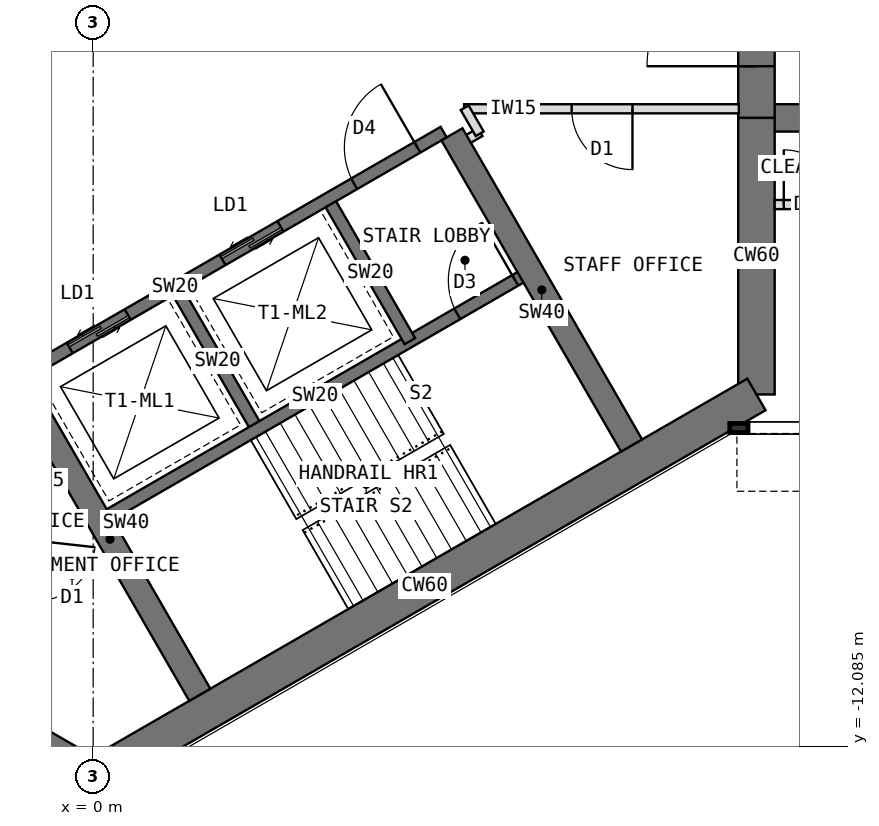
"""IFC4 building model, lengths in metres.
Left out: names, types, materials, properties, quantities, classifications, styles, units other than length and angle.
Written with IfcOpenShell. Run it as: python <this file> out.ifc"""

import sys

from ifc_helpers import new_model, si_unit, direction, frame, frame_2d, origin, place, context, subcontext, project, spatial, rectangle, extrude, element, fill, save


model = new_model("IFC4")
c1 = context("Model", 3, precision=1e-05, world=origin(), true_north=direction((0.0, 1.0)))
c2 = subcontext(c1, "Body", "Model", "MODEL_VIEW")
j1 = project(units=[si_unit("LENGTHUNIT", "METRE"), si_unit("PLANEANGLEUNIT", "RADIAN")], contexts=[c1])
p1 = place(None, origin())
s1 = spatial("IfcSite", under=j1, at=p1, CompositionType="ELEMENT")
p2 = place(p1, origin())
s2 = spatial("IfcBuilding", under=s1, at=p2, CompositionType="ELEMENT")
p3 = place(p2, frame((0.0, 0.0, 121.5)))
s3 = spatial("IfcBuildingStorey", under=s2, at=p3, CompositionType="ELEMENT", Elevation=121.5)
p4 = place(p3, frame((10.908, -6.298, 0.0), z_axis=(0.0, 0.0, 1.0), x_axis=(0.0, 1.0, 0.0)))
e1 = element("IfcWall", 1, at=p4, inside=s3, PredefinedType="SHEAR", context=c2, shape_type="SweptSolid", body=[
    extrude(rectangle(XDim=4.548, YDim=0.6, at=frame_2d((2.274, 0.0))), origin(), (0.0, 0.0, 1.0), 4.0),
])
p5 = place(p3, frame((10.908, -1.75, 0.0), z_axis=(0.0, 0.0, 1.0), x_axis=(0.0, 1.0, 0.0)))
e2 = element("IfcWall", 2, at=p5, inside=s3, PredefinedType="SHEAR", context=c2, shape_type="SweptSolid", body=[
    extrude(rectangle(XDim=3.5, YDim=0.6, at=frame_2d((1.75, 0.0))), origin(), (0.0, 0.0, 1.0), 4.0),
])
p6 = place(p5, frame((0.85, 0.0, 0.0)))
e3 = element("IfcOpeningElement", 3, at=p6, cuts=e2, PredefinedType="OPENING", context=c2, shape_type="SweptSolid", body=[
    extrude(rectangle(XDim=1.8, YDim=2.1, at=frame_2d((0.9, 1.05))), frame((0.0, 0.31, 0.0), z_axis=(0.0, -1.0, 0.0), x_axis=(1.0, 0.0, 0.0)), (0.0, 0.0, 1.0), 0.62),
])
p7 = place(p3, frame((-3.939, -10.322, 0.0), z_axis=(0.0, 0.0, 1.0), x_axis=(0.866011268655, -0.500024481964, 0.0)))
e4 = element("IfcWall", 4, at=p7, inside=s3, PredefinedType="SHEAR", context=c2, shape_type="SweptSolid", body=[
    extrude(rectangle(XDim=4.548, YDim=0.6, at=frame_2d((2.274, 0.0))), origin(), (0.0, 0.0, 1.0), 4.0),
])
p8 = place(p3, frame((0.0, -12.596, 0.0), z_axis=(0.0, 0.0, 1.0), x_axis=(0.866021940709, 0.500005998175, 0.0)))
e5 = element("IfcWall", 5, at=p8, inside=s3, PredefinedType="SHEAR", context=c2, shape_type="SweptSolid", body=[
    extrude(rectangle(XDim=12.596, YDim=0.6, at=frame_2d((6.298, 0.0))), origin(), (0.0, 0.0, 1.0), 4.0),
])
p9 = place(p3, frame((10.908, -1.75, 0.0), z_axis=(0.0, 0.0, 1.0), x_axis=(1.0, 0.0, 0.0)))
e6 = element("IfcWall", 6, at=p9, inside=s3, PredefinedType="SHEAR", context=c2, shape_type="SweptSolid", body=[
    extrude(rectangle(XDim=2.592, YDim=0.45, at=frame_2d((1.296, 0.0))), origin(), (0.0, 0.0, 1.0), 4.0),
])
p10 = place(p3, frame((-1.164, -5.984, 0.0), z_axis=(0.0, 0.0, 1.0), x_axis=(0.866026010844, 0.49999894854, 0.0)))
e7 = element("IfcWall", 7, at=p10, inside=s3, PredefinedType="SHEAR", context=c2, shape_type="SweptSolid", body=[
    extrude(rectangle(XDim=8.0, YDim=0.2, at=frame_2d((4.0, 0.0))), origin(), (0.0, 0.0, 1.0), 4.0),
])
p11 = place(p10, frame((6.3, 0.0, 0.0)))
e8 = element("IfcOpeningElement", 8, at=p11, cuts=e7, PredefinedType="OPENING", context=c2, shape_type="SweptSolid", body=[
    extrude(rectangle(XDim=1.2, YDim=2.1, at=frame_2d((0.6, 1.05))), frame((0.0, 0.11, 0.0), z_axis=(0.0, -1.0, 0.0), x_axis=(1.0, 0.0, 0.0)), (0.0, 0.0, 1.0), 0.22),
])
p12 = place(p10, frame((0.9, 0.0, 0.0)))
e9 = element("IfcOpeningElement", 9, at=p12, cuts=e7, PredefinedType="OPENING", context=c2, shape_type="SweptSolid", body=[
    extrude(rectangle(XDim=1.1, YDim=2.2, at=frame_2d((0.55, 1.1))), frame((0.0, 0.11, 0.0), z_axis=(0.0, -1.0, 0.0), x_axis=(1.0, 0.0, 0.0)), (0.0, 0.0, 1.0), 0.22),
])
p13 = place(p10, frame((3.8, 0.0, 0.0)))
e10 = element("IfcOpeningElement", 10, at=p13, cuts=e7, PredefinedType="OPENING", context=c2, shape_type="SweptSolid", body=[
    extrude(rectangle(XDim=1.1, YDim=2.2, at=frame_2d((0.55, 1.1))), frame((0.0, 0.11, 0.0), z_axis=(0.0, -1.0, 0.0), x_axis=(1.0, 0.0, 0.0)), (0.0, 0.0, 1.0), 0.22),
])
p14 = place(p3, frame((1.397, -4.62, 0.0), z_axis=(0.0, 0.0, 1.0), x_axis=(0.499936506574, -0.866062058628, 0.0)))
e11 = element("IfcWall", 11, at=p14, inside=s3, PredefinedType="SHEAR", context=c2, shape_type="SweptSolid", body=[
    extrude(rectangle(XDim=2.6, YDim=0.2, at=frame_2d((1.3, 0.0))), origin(), (0.0, 0.0, 1.0), 4.0),
])
p15 = place(p3, frame((3.909, -3.17, 0.0), z_axis=(0.0, 0.0, 1.0), x_axis=(0.49997716683, -0.86603858612, 0.0)))
e12 = element("IfcWall", 12, at=p15, inside=s3, PredefinedType="SHEAR", context=c2, shape_type="SweptSolid", body=[
    extrude(rectangle(XDim=2.6, YDim=0.2, at=frame_2d((1.3, 0.0))), origin(), (0.0, 0.0, 1.0), 4.0),
])
p16 = place(p3, frame((0.186, -8.322, 0.0), z_axis=(0.0, 0.0, 1.0), x_axis=(0.866026010844, 0.49999894854, 0.0)))
e13 = element("IfcWall", 13, at=p16, inside=s3, PredefinedType="SHEAR", context=c2, shape_type="SweptSolid", body=[
    extrude(rectangle(XDim=8.0, YDim=0.2, at=frame_2d((4.0, 0.0))), origin(), (0.0, 0.0, 1.0), 4.0),
])
p17 = place(p16, frame((6.7, 0.0, 0.0)))
e14 = element("IfcOpeningElement", 14, at=p17, cuts=e13, PredefinedType="OPENING", context=c2, shape_type="SweptSolid", body=[
    extrude(rectangle(XDim=1.1, YDim=2.1, at=frame_2d((0.55, 1.05))), frame((0.0, 0.11, 0.0), z_axis=(0.0, -1.0, 0.0), x_axis=(1.0, 0.0, 0.0)), (0.0, 0.0, 1.0), 0.22),
])
p18 = place(p3, frame((5.901, -2.02, 0.0), z_axis=(0.0, 0.0, 1.0), x_axis=(0.500027676417, -0.866009424208, 0.0)))
e15 = element("IfcWall", 15, at=p18, inside=s3, PredefinedType="SHEAR", context=c2, shape_type="SweptSolid", body=[
    extrude(rectangle(XDim=5.908, YDim=0.4, at=frame_2d((2.954, 0.0))), origin(), (0.0, 0.0, 1.0), 4.0),
])
p19 = place(p3, frame((-1.201, -6.12, 0.0), z_axis=(0.0, 0.0, 1.0), x_axis=(0.49999668571, -0.866027317282, 0.0)))
e16 = element("IfcWall", 16, at=p19, inside=s3, PredefinedType="SHEAR", context=c2, shape_type="SweptSolid", body=[
    extrude(rectangle(XDim=5.908, YDim=0.4, at=frame_2d((2.954, 0.0))), origin(), (0.0, 0.0, 1.0), 4.0),
])
p20 = place(p3, frame((11.208, -3.175, 0.0), z_axis=(0.0, 0.0, 1.0), x_axis=(1.0, 0.0, 0.0)))
e17 = element("IfcWall", 17, at=p20, inside=s3, PredefinedType="PARTITIONING", context=c2, shape_type="SweptSolid", body=[
    extrude(rectangle(XDim=2.4, YDim=0.15, at=frame_2d((1.2, 0.0))), origin(), (0.0, 0.0, 1.0), 3.8),
])
p21 = place(p20, frame((0.15, 0.0, 0.0)))
e18 = element("IfcOpeningElement", 18, at=p21, cuts=e17, PredefinedType="OPENING", context=c2, shape_type="SweptSolid", body=[
    extrude(rectangle(XDim=0.9, YDim=2.1, at=frame_2d((0.45, 1.05))), frame((0.0, 0.085, 0.0), z_axis=(0.0, -1.0, 0.0), x_axis=(1.0, 0.0, 0.0)), (0.0, 0.0, 1.0), 0.17),
])
p22 = place(p3, frame((6.365, -1.983, 0.0), z_axis=(0.0, 0.0, 1.0), x_axis=(-0.865892400268, -0.500230298122, 0.0)))
e19 = element("IfcWall", 19, at=p22, inside=s3, PredefinedType="PARTITIONING", context=c2, shape_type="SweptSolid", body=[
    extrude(rectangle(XDim=0.43, YDim=0.15, at=frame_2d((0.215, 0.0))), origin(), (0.0, 0.0, 1.0), 3.8),
])
p23 = place(p3, frame((10.618, -1.6, 0.0), z_axis=(0.0, 0.0, 1.0), x_axis=(-1.0, 0.0, 0.0)))
e20 = element("IfcWall", 20, at=p23, inside=s3, PredefinedType="PARTITIONING", context=c2, shape_type="SweptSolid", body=[
    extrude(rectangle(XDim=4.519, YDim=0.15, at=frame_2d((2.259, 0.0))), origin(), (0.0, 0.0, 1.0), 3.8),
])
p24 = place(p23, frame((1.749, 0.0, 0.0)))
e21 = element("IfcOpeningElement", 21, at=p24, cuts=e20, PredefinedType="OPENING", context=c2, shape_type="SweptSolid", body=[
    extrude(rectangle(XDim=1.0, YDim=2.1, at=frame_2d((0.5, 1.05))), frame((0.0, 0.085, 0.0), z_axis=(0.0, -1.0, 0.0), x_axis=(1.0, 0.0, 0.0)), (0.0, 0.0, 1.0), 0.17),
])
p25 = place(p3, frame((6.11, -1.583, 0.0), z_axis=(0.0, 0.0, 1.0), x_axis=(0.50033519877, -0.865831790172, 0.0)))
e22 = element("IfcWall", 22, at=p25, inside=s3, PredefinedType="PARTITIONING", context=c2, shape_type="SweptSolid", body=[
    extrude(rectangle(XDim=0.494, YDim=0.15, at=frame_2d((0.247, 0.0))), origin(), (0.0, 0.0, 1.0), 3.8),
])
p26 = place(p11, origin())
e23 = element("IfcDoor", 23, at=p26, inside=s3, OperationType="SINGLE_SWING_RIGHT", PredefinedType="DOOR", context=c2, shape_type="SweptSolid", body=[
    extrude(rectangle(XDim=1.2, YDim=2.1, at=frame_2d((0.6, 1.05))), frame((0.0, 0.025, 0.0), z_axis=(0.0, -1.0, 0.0), x_axis=(1.0, 0.0, 0.0)), (0.0, 0.0, 1.0), 0.05),
])
fill(e8, e23)
p27 = place(p12, origin())
e24 = element("IfcDoor", 24, at=p27, inside=s3, OperationType="DOUBLE_DOOR_SLIDING", PredefinedType="DOOR", context=c2, shape_type="SweptSolid", body=[
    extrude(rectangle(XDim=1.1, YDim=2.2, at=frame_2d((0.55, 1.1))), frame((0.0, 0.025, 0.0), z_axis=(0.0, -1.0, 0.0), x_axis=(1.0, 0.0, 0.0)), (0.0, 0.0, 1.0), 0.05),
])
fill(e9, e24)
p28 = place(p13, origin())
e25 = element("IfcDoor", 25, at=p28, inside=s3, OperationType="DOUBLE_DOOR_SLIDING", PredefinedType="DOOR", context=c2, shape_type="SweptSolid", body=[
    extrude(rectangle(XDim=1.1, YDim=2.2, at=frame_2d((0.55, 1.1))), frame((0.0, 0.025, 0.0), z_axis=(0.0, -1.0, 0.0), x_axis=(1.0, 0.0, 0.0)), (0.0, 0.0, 1.0), 0.05),
])
fill(e10, e25)
p29 = place(p17, origin())
e26 = element("IfcDoor", 26, at=p29, inside=s3, OperationType="SINGLE_SWING_RIGHT", PredefinedType="DOOR", context=c2, shape_type="SweptSolid", body=[
    extrude(rectangle(XDim=1.1, YDim=2.1, at=frame_2d((0.55, 1.05))), frame((0.0, 0.025, 0.0), z_axis=(0.0, -1.0, 0.0), x_axis=(1.0, 0.0, 0.0)), (0.0, 0.0, 1.0), 0.05),
])
fill(e14, e26)
p30 = place(p6, origin())
e27 = element("IfcDoor", 27, at=p30, inside=s3, OperationType="DOUBLE_DOOR_DOUBLE_SWING", PredefinedType="DOOR", context=c2, shape_type="SweptSolid", body=[
    extrude(rectangle(XDim=1.72, YDim=2.06, at=frame_2d((0.9, 1.03))), frame((0.0, 0.025, 0.0), z_axis=(0.0, -1.0, 0.0), x_axis=(1.0, 0.0, 0.0)), (0.0, 0.0, 1.0), 0.05),
    extrude(rectangle(XDim=0.04, YDim=2.1, at=frame_2d((0.02, 1.05))), frame((0.0, 0.3, 0.0), z_axis=(0.0, -1.0, 0.0), x_axis=(1.0, 0.0, 0.0)), (0.0, 0.0, 1.0), 0.6),
    extrude(rectangle(XDim=0.04, YDim=2.1, at=frame_2d((1.78, 1.05))), frame((0.0, 0.3, 0.0), z_axis=(0.0, -1.0, 0.0), x_axis=(1.0, 0.0, 0.0)), (0.0, 0.0, 1.0), 0.6),
    extrude(rectangle(XDim=1.72, YDim=0.04, at=frame_2d((0.9, 2.08))), frame((0.0, 0.3, 0.0), z_axis=(0.0, -1.0, 0.0), x_axis=(1.0, 0.0, 0.0)), (0.0, 0.0, 1.0), 0.6),
])
fill(e3, e27)
p31 = place(p21, origin())
e28 = element("IfcDoor", 28, at=p31, inside=s3, OperationType="SINGLE_SWING_LEFT", PredefinedType="DOOR", context=c2, shape_type="SweptSolid", body=[
    extrude(rectangle(XDim=0.9, YDim=2.1, at=frame_2d((0.45, 1.05))), frame((0.0, 0.025, 0.0), z_axis=(0.0, -1.0, 0.0), x_axis=(1.0, 0.0, 0.0)), (0.0, 0.0, 1.0), 0.05),
])
fill(e18, e28)
p32 = place(p24, origin())
e29 = element("IfcDoor", 29, at=p32, inside=s3, OperationType="SINGLE_SWING_LEFT", PredefinedType="DOOR", context=c2, shape_type="SweptSolid", body=[
    extrude(rectangle(XDim=1.0, YDim=2.1, at=frame_2d((0.5, 1.05))), frame((0.0, 0.025, 0.0), z_axis=(0.0, -1.0, 0.0), x_axis=(1.0, 0.0, 0.0)), (0.0, 0.0, 1.0), 0.05),
])
fill(e21, e29)
save(model, sys.argv[1])
